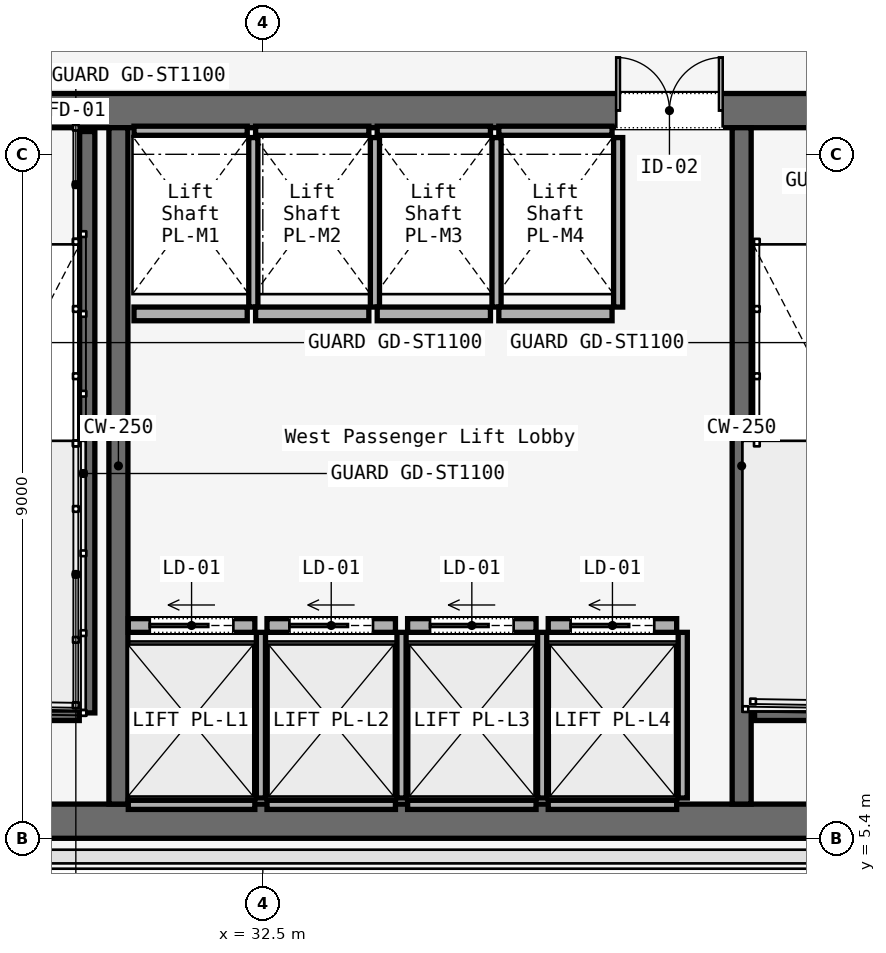
"""IFC4 building model, lengths in metres.
Left out: names, types, materials, properties, quantities, classifications, styles, units other than length and angle.
Written with IfcOpenShell. Run it as: python <this file> out.ifc"""

import sys

from ifc_helpers import new_model, si_unit, direction, frame, frame_2d, origin, place, context, subcontext, project, spatial, rectangle, extrude, element, fill, save


model = new_model("IFC4")
c1 = context("Model", 3, precision=1e-05, world=origin(), true_north=direction((0.0, 1.0)))
c2 = subcontext(c1, "Body", "Model", "MODEL_VIEW")
j1 = project(units=[si_unit("LENGTHUNIT", "METRE"), si_unit("PLANEANGLEUNIT", "RADIAN")], contexts=[c1])
p1 = place(None, origin())
s1 = spatial("IfcSite", under=j1, at=p1, CompositionType="ELEMENT")
p2 = place(p1, origin())
s2 = spatial("IfcBuilding", under=s1, at=p2, CompositionType="ELEMENT")
p3 = place(p2, frame((0.0, 0.0, 39.8)))
s3 = spatial("IfcBuildingStorey", under=s2, at=p3, CompositionType="ELEMENT", Elevation=39.8)
p4 = place(p3, frame((26.45, 14.975, 0.0), z_axis=(0.0, 0.0, 1.0), x_axis=(1.0, 0.0, 0.0)))
e1 = element("IfcWall", 1, at=p4, inside=s3, PredefinedType="SOLIDWALL", context=c2, shape_type="SweptSolid", body=[
    extrude(rectangle(XDim=31.1, YDim=0.45, at=frame_2d((15.55, 0.0))), origin(), (0.0, 0.0, 1.0), 3.58),
])
p5 = place(p4, frame((1.65, 0.0, 0.0)))
e2 = element("IfcOpeningElement", 2, at=p5, cuts=e1, PredefinedType="OPENING", context=c2, shape_type="SweptSolid", body=[
    extrude(rectangle(XDim=1.1, YDim=2.2, at=frame_2d((0.55, 1.1))), frame((0.0, 0.225, 0.0), z_axis=(0.0, -1.0, 0.0), x_axis=(1.0, 0.0, 0.0)), (0.0, 0.0, 1.0), 0.45),
])
p6 = place(p4, frame((13.65, 0.0, 0.0)))
e3 = element("IfcOpeningElement", 3, at=p6, cuts=e1, PredefinedType="OPENING", context=c2, shape_type="SweptSolid", body=[
    extrude(rectangle(XDim=1.1, YDim=2.2, at=frame_2d((0.55, 1.1))), frame((0.0, 0.225, 0.0), z_axis=(0.0, -1.0, 0.0), x_axis=(1.0, 0.0, 0.0)), (0.0, 0.0, 1.0), 0.45),
])
p7 = place(p4, frame((25.55, 0.0, 0.0)))
e4 = element("IfcOpeningElement", 4, at=p7, cuts=e1, PredefinedType="OPENING", context=c2, shape_type="SweptSolid", body=[
    extrude(rectangle(XDim=1.1, YDim=2.2, at=frame_2d((0.55, 1.1))), frame((0.0, 0.225, 0.0), z_axis=(0.0, -1.0, 0.0), x_axis=(1.0, 0.0, 0.0)), (0.0, 0.0, 1.0), 0.45),
])
p8 = place(p4, frame((10.7, 0.0, 0.0)))
e5 = element("IfcOpeningElement", 5, at=p8, cuts=e1, PredefinedType="OPENING", context=c2, shape_type="SweptSolid", body=[
    extrude(rectangle(XDim=1.4, YDim=2.2, at=frame_2d((0.7, 1.1))), frame((0.0, 0.225, 0.0), z_axis=(0.0, -1.0, 0.0), x_axis=(1.0, 0.0, 0.0)), (0.0, 0.0, 1.0), 0.45),
])
p9 = place(p4, frame((19.35, 0.0, 0.0)))
e6 = element("IfcOpeningElement", 6, at=p9, cuts=e1, PredefinedType="OPENING", context=c2, shape_type="SweptSolid", body=[
    extrude(rectangle(XDim=1.1, YDim=2.2, at=frame_2d((0.55, 1.1))), frame((0.0, 0.225, 0.0), z_axis=(0.0, -1.0, 0.0), x_axis=(1.0, 0.0, 0.0)), (0.0, 0.0, 1.0), 0.45),
])
p10 = place(p4, frame((21.4, 0.0, 0.0)))
e7 = element("IfcOpeningElement", 7, at=p10, cuts=e1, PredefinedType="OPENING", context=c2, shape_type="SweptSolid", body=[
    extrude(rectangle(XDim=0.9, YDim=2.1, at=frame_2d((0.45, 1.05))), frame((0.0, 0.225, 0.0), z_axis=(0.0, -1.0, 0.0), x_axis=(1.0, 0.0, 0.0)), (0.0, 0.0, 1.0), 0.45),
])
p11 = place(p4, frame((23.35, 0.0, 0.0)))
e8 = element("IfcOpeningElement", 8, at=p11, cuts=e1, PredefinedType="OPENING", context=c2, shape_type="SweptSolid", body=[
    extrude(rectangle(XDim=1.3, YDim=2.3, at=frame_2d((0.65, 1.15))), frame((0.0, 0.225, 0.0), z_axis=(0.0, -1.0, 0.0), x_axis=(1.0, 0.0, 0.0)), (0.0, 0.0, 1.0), 0.45),
])
p12 = place(p3, frame((26.45, 5.625, 0.0), z_axis=(0.0, 0.0, 1.0), x_axis=(1.0, 0.0, 0.0)))
e9 = element("IfcWall", 9, at=p12, inside=s3, PredefinedType="SOLIDWALL", context=c2, shape_type="SweptSolid", body=[
    extrude(rectangle(XDim=31.1, YDim=0.45, at=frame_2d((15.55, 0.0))), origin(), (0.0, 0.0, 1.0), 3.58),
])
for number, where, z_axis, x_axis in (
    (10, (30.6, 5.85, 0.0), (0.0, 0.0, 1.0), (0.0, 1.0, 0.0)),
    (11, (38.8, 5.85, 0.0), (0.0, 0.0, 1.0), (0.0, 1.0, 0.0)),
):
    element("IfcWall", number, at=place(p3, frame(where, z_axis=z_axis, x_axis=x_axis)), inside=s3, PredefinedType="SOLIDWALL", context=c2, shape_type="SweptSolid", body=[
        extrude(rectangle(XDim=8.9, YDim=0.25, at=frame_2d((4.45, 0.0))), origin(), (0.0, 0.0, 1.0), 3.58),
    ])
p13 = place(p3, frame((30.19, 14.7, 0.0), z_axis=(0.0, 0.0, 1.0), x_axis=(0.0, -1.0, 0.0)))
e12 = element("IfcWall", 12, at=p13, inside=s3, PredefinedType="SOLIDWALL", context=c2, shape_type="SweptSolid", body=[
    extrude(rectangle(XDim=7.65, YDim=0.2, at=frame_2d((3.825, 0.0))), origin(), (0.0, 0.0, 1.0), 3.8),
])
for number, where, z_axis, x_axis in (
    (13, (26.97, 7.05, 0.0), (0.0, 0.0, 1.0), (1.0, 0.0, 0.0)),
    (14, (38.97, 7.05, 0.0), (0.0, 0.0, 1.0), (1.0, 0.0, 0.0)),
):
    element("IfcWall", number, at=place(p3, frame(where, z_axis=z_axis, x_axis=x_axis)), inside=s3, PredefinedType="SOLIDWALL", context=c2, shape_type="SweptSolid", body=[
        extrude(rectangle(XDim=3.115, YDim=0.2, at=frame_2d((1.558, 0.0))), origin(), (0.0, 0.0, 1.0), 3.8),
    ])
p14 = place(p3, frame((30.73, 8.2, 0.0), z_axis=(0.0, 0.0, 1.0), x_axis=(1.0, 0.0, 0.0)))
e15 = element("IfcWall", 15, at=p14, inside=s3, PredefinedType="SOLIDWALL", context=c2, shape_type="SweptSolid", body=[
    extrude(rectangle(XDim=1.665, YDim=0.18, at=frame_2d((0.833, 0.0))), origin(), (0.0, 0.0, 1.0), 2.933),
])
p15 = place(p14, frame((0.282, 0.0, 0.0)))
e16 = element("IfcOpeningElement", 16, at=p15, cuts=e15, PredefinedType="OPENING", context=c2, shape_type="SweptSolid", body=[
    extrude(rectangle(XDim=1.1, YDim=2.2, at=frame_2d((0.55, 1.1))), frame((0.0, 0.09, 0.0), z_axis=(0.0, -1.0, 0.0), x_axis=(1.0, 0.0, 0.0)), (0.0, 0.0, 1.0), 0.18),
])
p16 = place(p3, frame((30.73, 5.84, 0.0), z_axis=(0.0, 0.0, 1.0), x_axis=(1.0, 0.0, 0.0)))
e17 = element("IfcWall", 17, at=p16, inside=s3, PredefinedType="SOLIDWALL", context=c2, shape_type="SweptSolid", body=[
    extrude(rectangle(XDim=1.665, YDim=0.12, at=frame_2d((0.833, 0.0))), origin(), (0.0, 0.0, 1.0), 2.933),
])
p17 = place(p3, frame((32.475, 5.93, 0.0), z_axis=(0.0, 0.0, 1.0), x_axis=(0.0, 1.0, 0.0)))
e18 = element("IfcWall", 18, at=p17, inside=s3, PredefinedType="SOLIDWALL", context=c2, shape_type="SweptSolid", body=[
    extrude(rectangle(XDim=2.18, YDim=0.12, at=frame_2d((1.09, 0.0))), origin(), (0.0, 0.0, 1.0), 2.933),
])
p18 = place(p3, frame((32.555, 8.2, 0.0), z_axis=(0.0, 0.0, 1.0), x_axis=(1.0, 0.0, 0.0)))
e19 = element("IfcWall", 19, at=p18, inside=s3, PredefinedType="SOLIDWALL", context=c2, shape_type="SweptSolid", body=[
    extrude(rectangle(XDim=1.69, YDim=0.18, at=frame_2d((0.845, 0.0))), origin(), (0.0, 0.0, 1.0), 2.933),
])
p19 = place(p18, frame((0.295, 0.0, 0.0)))
e20 = element("IfcOpeningElement", 20, at=p19, cuts=e19, PredefinedType="OPENING", context=c2, shape_type="SweptSolid", body=[
    extrude(rectangle(XDim=1.1, YDim=2.2, at=frame_2d((0.55, 1.1))), frame((0.0, 0.09, 0.0), z_axis=(0.0, -1.0, 0.0), x_axis=(1.0, 0.0, 0.0)), (0.0, 0.0, 1.0), 0.18),
])
p20 = place(p3, frame((32.555, 5.84, 0.0), z_axis=(0.0, 0.0, 1.0), x_axis=(1.0, 0.0, 0.0)))
e21 = element("IfcWall", 21, at=p20, inside=s3, PredefinedType="SOLIDWALL", context=c2, shape_type="SweptSolid", body=[
    extrude(rectangle(XDim=1.69, YDim=0.12, at=frame_2d((0.845, 0.0))), origin(), (0.0, 0.0, 1.0), 2.933),
])
p21 = place(p3, frame((34.325, 5.93, 0.0), z_axis=(0.0, 0.0, 1.0), x_axis=(0.0, 1.0, 0.0)))
e22 = element("IfcWall", 22, at=p21, inside=s3, PredefinedType="SOLIDWALL", context=c2, shape_type="SweptSolid", body=[
    extrude(rectangle(XDim=2.18, YDim=0.12, at=frame_2d((1.09, 0.0))), origin(), (0.0, 0.0, 1.0), 2.933),
])
p22 = place(p3, frame((34.405, 8.2, 0.0), z_axis=(0.0, 0.0, 1.0), x_axis=(1.0, 0.0, 0.0)))
e23 = element("IfcWall", 23, at=p22, inside=s3, PredefinedType="SOLIDWALL", context=c2, shape_type="SweptSolid", body=[
    extrude(rectangle(XDim=1.69, YDim=0.18, at=frame_2d((0.845, 0.0))), origin(), (0.0, 0.0, 1.0), 2.933),
])
p23 = place(p22, frame((0.295, 0.0, 0.0)))
e24 = element("IfcOpeningElement", 24, at=p23, cuts=e23, PredefinedType="OPENING", context=c2, shape_type="SweptSolid", body=[
    extrude(rectangle(XDim=1.1, YDim=2.2, at=frame_2d((0.55, 1.1))), frame((0.0, 0.09, 0.0), z_axis=(0.0, -1.0, 0.0), x_axis=(1.0, 0.0, 0.0)), (0.0, 0.0, 1.0), 0.18),
])
p24 = place(p3, frame((34.405, 5.84, 0.0), z_axis=(0.0, 0.0, 1.0), x_axis=(1.0, 0.0, 0.0)))
e25 = element("IfcWall", 25, at=p24, inside=s3, PredefinedType="SOLIDWALL", context=c2, shape_type="SweptSolid", body=[
    extrude(rectangle(XDim=1.69, YDim=0.12, at=frame_2d((0.845, 0.0))), origin(), (0.0, 0.0, 1.0), 2.933),
])
p25 = place(p3, frame((36.175, 5.93, 0.0), z_axis=(0.0, 0.0, 1.0), x_axis=(0.0, 1.0, 0.0)))
e26 = element("IfcWall", 26, at=p25, inside=s3, PredefinedType="SOLIDWALL", context=c2, shape_type="SweptSolid", body=[
    extrude(rectangle(XDim=2.18, YDim=0.12, at=frame_2d((1.09, 0.0))), origin(), (0.0, 0.0, 1.0), 2.933),
])
p26 = place(p3, frame((36.255, 8.2, 0.0), z_axis=(0.0, 0.0, 1.0), x_axis=(1.0, 0.0, 0.0)))
e27 = element("IfcWall", 27, at=p26, inside=s3, PredefinedType="SOLIDWALL", context=c2, shape_type="SweptSolid", body=[
    extrude(rectangle(XDim=1.69, YDim=0.18, at=frame_2d((0.845, 0.0))), origin(), (0.0, 0.0, 1.0), 2.933),
])
p27 = place(p26, frame((0.295, 0.0, 0.0)))
e28 = element("IfcOpeningElement", 28, at=p27, cuts=e27, PredefinedType="OPENING", context=c2, shape_type="SweptSolid", body=[
    extrude(rectangle(XDim=1.1, YDim=2.2, at=frame_2d((0.55, 1.1))), frame((0.0, 0.09, 0.0), z_axis=(0.0, -1.0, 0.0), x_axis=(1.0, 0.0, 0.0)), (0.0, 0.0, 1.0), 0.18),
])
p28 = place(p3, frame((36.255, 5.84, 0.0), z_axis=(0.0, 0.0, 1.0), x_axis=(1.0, 0.0, 0.0)))
e29 = element("IfcWall", 29, at=p28, inside=s3, PredefinedType="SOLIDWALL", context=c2, shape_type="SweptSolid", body=[
    extrude(rectangle(XDim=1.69, YDim=0.12, at=frame_2d((0.845, 0.0))), origin(), (0.0, 0.0, 1.0), 2.933),
])
p29 = place(p3, frame((38.025, 5.93, 0.0), z_axis=(0.0, 0.0, 1.0), x_axis=(0.0, 1.0, 0.0)))
e30 = element("IfcWall", 30, at=p29, inside=s3, PredefinedType="SOLIDWALL", context=c2, shape_type="SweptSolid", body=[
    extrude(rectangle(XDim=2.18, YDim=0.12, at=frame_2d((1.09, 0.0))), origin(), (0.0, 0.0, 1.0), 2.933),
])
p30 = place(p3, frame((30.805, 12.3, 0.0), z_axis=(0.0, 0.0, 1.0), x_axis=(1.0, 0.0, 0.0)))
e31 = element("IfcWall", 31, at=p30, inside=s3, PredefinedType="SOLIDWALL", context=c2, shape_type="SweptSolid", body=[
    extrude(rectangle(XDim=1.49, YDim=0.18, at=frame_2d((0.745, 0.0))), origin(), (0.0, 0.0, 1.0), 2.933),
])
p31 = place(p3, frame((30.805, 14.71, 0.0), z_axis=(0.0, 0.0, 1.0), x_axis=(1.0, 0.0, 0.0)))
e32 = element("IfcWall", 32, at=p31, inside=s3, PredefinedType="SOLIDWALL", context=c2, shape_type="SweptSolid", body=[
    extrude(rectangle(XDim=1.49, YDim=0.12, at=frame_2d((0.745, 0.0))), origin(), (0.0, 0.0, 1.0), 2.933),
])
p32 = place(p3, frame((32.375, 12.39, 0.0), z_axis=(0.0, 0.0, 1.0), x_axis=(0.0, 1.0, 0.0)))
e33 = element("IfcWall", 33, at=p32, inside=s3, PredefinedType="SOLIDWALL", context=c2, shape_type="SweptSolid", body=[
    extrude(rectangle(XDim=2.23, YDim=0.12, at=frame_2d((1.115, 0.0))), origin(), (0.0, 0.0, 1.0), 2.933),
])
p33 = place(p3, frame((32.405, 12.3, 0.0), z_axis=(0.0, 0.0, 1.0), x_axis=(1.0, 0.0, 0.0)))
e34 = element("IfcWall", 34, at=p33, inside=s3, PredefinedType="SOLIDWALL", context=c2, shape_type="SweptSolid", body=[
    extrude(rectangle(XDim=1.49, YDim=0.18, at=frame_2d((0.745, 0.0))), origin(), (0.0, 0.0, 1.0), 2.933),
])
p34 = place(p3, frame((32.405, 14.71, 0.0), z_axis=(0.0, 0.0, 1.0), x_axis=(1.0, 0.0, 0.0)))
e35 = element("IfcWall", 35, at=p34, inside=s3, PredefinedType="SOLIDWALL", context=c2, shape_type="SweptSolid", body=[
    extrude(rectangle(XDim=1.49, YDim=0.12, at=frame_2d((0.745, 0.0))), origin(), (0.0, 0.0, 1.0), 2.933),
])
p35 = place(p3, frame((33.975, 12.39, 0.0), z_axis=(0.0, 0.0, 1.0), x_axis=(0.0, 1.0, 0.0)))
e36 = element("IfcWall", 36, at=p35, inside=s3, PredefinedType="SOLIDWALL", context=c2, shape_type="SweptSolid", body=[
    extrude(rectangle(XDim=2.23, YDim=0.12, at=frame_2d((1.115, 0.0))), origin(), (0.0, 0.0, 1.0), 2.933),
])
p36 = place(p3, frame((34.005, 12.3, 0.0), z_axis=(0.0, 0.0, 1.0), x_axis=(1.0, 0.0, 0.0)))
e37 = element("IfcWall", 37, at=p36, inside=s3, PredefinedType="SOLIDWALL", context=c2, shape_type="SweptSolid", body=[
    extrude(rectangle(XDim=1.49, YDim=0.18, at=frame_2d((0.745, 0.0))), origin(), (0.0, 0.0, 1.0), 2.933),
])
p37 = place(p3, frame((34.005, 14.71, 0.0), z_axis=(0.0, 0.0, 1.0), x_axis=(1.0, 0.0, 0.0)))
e38 = element("IfcWall", 38, at=p37, inside=s3, PredefinedType="SOLIDWALL", context=c2, shape_type="SweptSolid", body=[
    extrude(rectangle(XDim=1.49, YDim=0.12, at=frame_2d((0.745, 0.0))), origin(), (0.0, 0.0, 1.0), 2.933),
])
p38 = place(p3, frame((35.575, 12.39, 0.0), z_axis=(0.0, 0.0, 1.0), x_axis=(0.0, 1.0, 0.0)))
e39 = element("IfcWall", 39, at=p38, inside=s3, PredefinedType="SOLIDWALL", context=c2, shape_type="SweptSolid", body=[
    extrude(rectangle(XDim=2.23, YDim=0.12, at=frame_2d((1.115, 0.0))), origin(), (0.0, 0.0, 1.0), 2.933),
])
p39 = place(p3, frame((35.605, 12.3, 0.0), z_axis=(0.0, 0.0, 1.0), x_axis=(1.0, 0.0, 0.0)))
e40 = element("IfcWall", 40, at=p39, inside=s3, PredefinedType="SOLIDWALL", context=c2, shape_type="SweptSolid", body=[
    extrude(rectangle(XDim=1.49, YDim=0.18, at=frame_2d((0.745, 0.0))), origin(), (0.0, 0.0, 1.0), 2.933),
])
p40 = place(p3, frame((35.605, 14.71, 0.0), z_axis=(0.0, 0.0, 1.0), x_axis=(1.0, 0.0, 0.0)))
e41 = element("IfcWall", 41, at=p40, inside=s3, PredefinedType="SOLIDWALL", context=c2, shape_type="SweptSolid", body=[
    extrude(rectangle(XDim=1.49, YDim=0.12, at=frame_2d((0.745, 0.0))), origin(), (0.0, 0.0, 1.0), 2.933),
])
p41 = place(p3, frame((37.175, 12.39, 0.0), z_axis=(0.0, 0.0, 1.0), x_axis=(0.0, 1.0, 0.0)))
e42 = element("IfcWall", 42, at=p41, inside=s3, PredefinedType="SOLIDWALL", context=c2, shape_type="SweptSolid", body=[
    extrude(rectangle(XDim=2.23, YDim=0.12, at=frame_2d((1.115, 0.0))), origin(), (0.0, 0.0, 1.0), 2.933),
])
p42 = place(p8, origin())
e43 = element("IfcDoor", 43, at=p42, inside=s3, OperationType="DOUBLE_DOOR_SINGLE_SWING", PredefinedType="DOOR", context=c2, shape_type="SweptSolid", body=[
    extrude(rectangle(XDim=1.4, YDim=2.2, at=frame_2d((0.7, 1.1))), frame((0.0, 0.025, 0.0), z_axis=(0.0, -1.0, 0.0), x_axis=(1.0, 0.0, 0.0)), (0.0, 0.0, 1.0), 0.05),
])
fill(e5, e43)
p43 = place(p15, origin())
e44 = element("IfcDoor", 44, at=p43, inside=s3, OperationType="SLIDING_TO_LEFT", PredefinedType="DOOR", context=c2, shape_type="SweptSolid", body=[
    extrude(rectangle(XDim=1.1, YDim=2.2, at=frame_2d((0.55, 1.1))), frame((0.0, 0.025, 0.0), z_axis=(0.0, -1.0, 0.0), x_axis=(1.0, 0.0, 0.0)), (0.0, 0.0, 1.0), 0.05),
])
fill(e16, e44)
p44 = place(p19, origin())
e45 = element("IfcDoor", 45, at=p44, inside=s3, OperationType="SLIDING_TO_LEFT", PredefinedType="DOOR", context=c2, shape_type="SweptSolid", body=[
    extrude(rectangle(XDim=1.1, YDim=2.2, at=frame_2d((0.55, 1.1))), frame((0.0, 0.025, 0.0), z_axis=(0.0, -1.0, 0.0), x_axis=(1.0, 0.0, 0.0)), (0.0, 0.0, 1.0), 0.05),
])
fill(e20, e45)
p45 = place(p23, origin())
e46 = element("IfcDoor", 46, at=p45, inside=s3, OperationType="SLIDING_TO_LEFT", PredefinedType="DOOR", context=c2, shape_type="SweptSolid", body=[
    extrude(rectangle(XDim=1.1, YDim=2.2, at=frame_2d((0.55, 1.1))), frame((0.0, 0.025, 0.0), z_axis=(0.0, -1.0, 0.0), x_axis=(1.0, 0.0, 0.0)), (0.0, 0.0, 1.0), 0.05),
])
fill(e24, e46)
p46 = place(p27, origin())
e47 = element("IfcDoor", 47, at=p46, inside=s3, OperationType="SLIDING_TO_LEFT", PredefinedType="DOOR", context=c2, shape_type="SweptSolid", body=[
    extrude(rectangle(XDim=1.1, YDim=2.2, at=frame_2d((0.55, 1.1))), frame((0.0, 0.025, 0.0), z_axis=(0.0, -1.0, 0.0), x_axis=(1.0, 0.0, 0.0)), (0.0, 0.0, 1.0), 0.05),
])
fill(e28, e47)
save(model, sys.argv[1])
